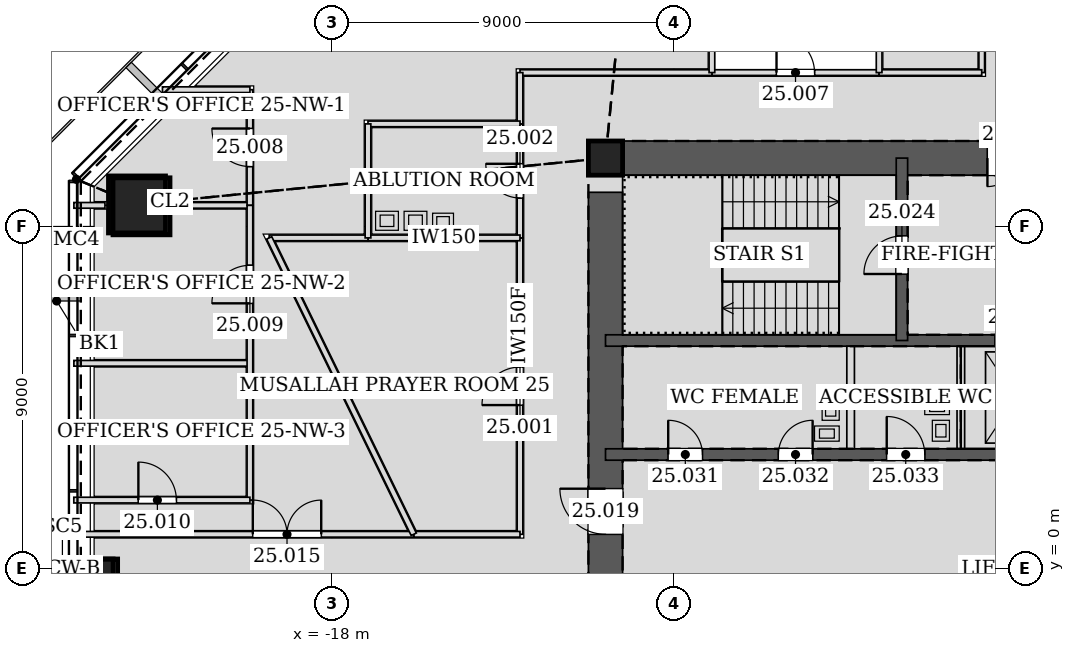
"""IFC4 building model, lengths in metres.
Left out: names, types, materials, properties, quantities, classifications, styles, units other than length and angle.
Written with IfcOpenShell. Run it as: python <this file> out.ifc"""

import sys

from ifc_helpers import new_model, si_unit, direction, frame, frame_2d, origin, origin_2d, place, context, subcontext, project, spatial, rectangle, hollow_rectangle, extrude, element, fill, save


model = new_model("IFC4")
c1 = context("Model", 3, precision=1e-05, world=origin(), true_north=direction((0.0, 1.0)))
c2 = subcontext(c1, "Body", "Model", "MODEL_VIEW")
j1 = project(units=[si_unit("LENGTHUNIT", "METRE"), si_unit("PLANEANGLEUNIT", "RADIAN")], contexts=[c1])
p1 = place(None, origin())
s1 = spatial("IfcSite", under=j1, at=p1, CompositionType="ELEMENT")
p2 = place(p1, origin())
s2 = spatial("IfcBuilding", under=s1, at=p2, CompositionType="ELEMENT")
p3 = place(p2, frame((0.0, 0.0, 113.4)))
s3 = spatial("IfcBuildingStorey", under=s2, at=p3, CompositionType="ELEMENT", Elevation=113.4)
p4 = place(p3, frame((-23.129, 9.58, 0.0), z_axis=(0.028294106277, -0.011677854952, 0.999531425846), x_axis=(0.38151339852, 0.924363308851, 0.0)))
e1 = element("IfcColumn", 1, at=p4, inside=s3, PredefinedType="COLUMN", context=c2, shape_type="SweptSolid", body=[
    extrude(hollow_rectangle(XDim=1.5, YDim=1.5, WallThickness=0.07, at=origin_2d()), origin(), (0.0, 0.0, 1.0), 4.202),
])
p5 = place(p3, frame((-24.007, 0.0, 0.0), z_axis=(0.02829603574, 0.0, 0.999599587015), x_axis=(0.0, 1.0, 0.0)))
e2 = element("IfcColumn", 2, at=p5, inside=s3, PredefinedType="COLUMN", context=c2, shape_type="SweptSolid", body=[
    extrude(hollow_rectangle(XDim=0.5, YDim=0.5, WallThickness=0.025, at=origin_2d()), origin(), (0.0, 0.0, 1.0), 4.202),
])
p6 = place(p3, frame((-10.8, 10.8, 0.0), z_axis=(0.0, 0.0, 1.0), x_axis=(1.0, 0.0, 0.0)))
e3 = element("IfcColumn", 3, at=p6, inside=s3, PredefinedType="COLUMN", context=c2, shape_type="SweptSolid", body=[
    extrude(hollow_rectangle(XDim=0.9, YDim=0.9, WallThickness=0.06, at=origin_2d()), origin(), (0.0, 0.0, 1.0), 4.2),
])
p7 = place(p3, frame((10.8, 10.8, 0.0), z_axis=(0.0, 0.0, 1.0), x_axis=(-1.0, 0.0, 0.0)))
e4 = element("IfcWall", 4, at=p7, inside=s3, PredefinedType="SOLIDWALL", context=c2, shape_type="SweptSolid", body=[
    extrude(rectangle(XDim=21.6, YDim=0.9, at=frame_2d((10.8, 0.0))), origin(), (0.0, 0.0, 1.0), 4.2),
])
p8 = place(p7, frame((10.05, 0.0, 0.0)))
e5 = element("IfcOpeningElement", 5, at=p8, cuts=e4, PredefinedType="OPENING", context=c2, shape_type="SweptSolid", body=[
    extrude(rectangle(XDim=1.5, YDim=2.1, at=frame_2d((0.75, 1.05))), frame((0.0, 0.46, 0.0), z_axis=(0.0, -1.0, 0.0), x_axis=(1.0, 0.0, 0.0)), (0.0, 0.0, 1.0), 0.92),
])
p9 = place(p3, frame((-10.8, 10.8, 0.0), z_axis=(0.0, 0.0, 1.0), x_axis=(0.0, -1.0, 0.0)))
e6 = element("IfcWall", 6, at=p9, inside=s3, PredefinedType="SOLIDWALL", context=c2, shape_type="SweptSolid", body=[
    extrude(rectangle(XDim=21.6, YDim=0.9, at=frame_2d((10.8, 0.0))), origin(), (0.0, 0.0, 1.0), 4.2),
])
p10 = place(p9, frame((8.7, 0.0, 0.0)))
e7 = element("IfcOpeningElement", 7, at=p10, cuts=e6, PredefinedType="OPENING", context=c2, shape_type="SweptSolid", body=[
    extrude(rectangle(XDim=1.2, YDim=2.1, at=frame_2d((0.6, 1.05))), frame((0.0, 0.46, 0.0), z_axis=(0.0, -1.0, 0.0), x_axis=(1.0, 0.0, 0.0)), (0.0, 0.0, 1.0), 0.92),
])
p11 = place(p9, frame((11.7, 0.0, 0.0)))
e8 = element("IfcOpeningElement", 8, at=p11, cuts=e6, PredefinedType="OPENING", context=c2, shape_type="SweptSolid", body=[
    extrude(rectangle(XDim=1.2, YDim=2.1, at=frame_2d((0.6, 1.05))), frame((0.0, 0.46, 0.0), z_axis=(0.0, -1.0, 0.0), x_axis=(1.0, 0.0, 0.0)), (0.0, 0.0, 1.0), 0.92),
])
p12 = place(p3, frame((-10.8, 3.0, 0.0), z_axis=(0.0, 0.0, 1.0), x_axis=(1.0, 0.0, 0.0)))
e9 = element("IfcWall", 9, at=p12, inside=s3, PredefinedType="SOLIDWALL", context=c2, shape_type="SweptSolid", body=[
    extrude(rectangle(XDim=21.6, YDim=0.3, at=frame_2d((10.8, 0.0))), origin(), (0.0, 0.0, 1.0), 4.2),
])
p13 = place(p12, frame((1.65, 0.0, 0.0)))
e10 = element("IfcOpeningElement", 10, at=p13, cuts=e9, PredefinedType="OPENING", context=c2, shape_type="SweptSolid", body=[
    extrude(rectangle(XDim=0.9, YDim=2.1, at=frame_2d((0.45, 1.05))), frame((0.0, 0.16, 0.0), z_axis=(0.0, -1.0, 0.0), x_axis=(1.0, 0.0, 0.0)), (0.0, 0.0, 1.0), 0.32),
])
p14 = place(p12, frame((4.55, 0.0, 0.0)))
e11 = element("IfcOpeningElement", 11, at=p14, cuts=e9, PredefinedType="OPENING", context=c2, shape_type="SweptSolid", body=[
    extrude(rectangle(XDim=0.9, YDim=2.1, at=frame_2d((0.45, 1.05))), frame((0.0, 0.16, 0.0), z_axis=(0.0, -1.0, 0.0), x_axis=(1.0, 0.0, 0.0)), (0.0, 0.0, 1.0), 0.32),
])
p15 = place(p12, frame((7.4, 0.0, 0.0)))
e12 = element("IfcOpeningElement", 12, at=p15, cuts=e9, PredefinedType="OPENING", context=c2, shape_type="SweptSolid", body=[
    extrude(rectangle(XDim=1.0, YDim=2.1, at=frame_2d((0.5, 1.05))), frame((0.0, 0.16, 0.0), z_axis=(0.0, -1.0, 0.0), x_axis=(1.0, 0.0, 0.0)), (0.0, 0.0, 1.0), 0.32),
])
p16 = place(p12, frame((13.25, 0.0, 0.0)))
e13 = element("IfcOpeningElement", 13, at=p16, cuts=e9, PredefinedType="OPENING", context=c2, shape_type="SweptSolid", body=[
    extrude(rectangle(XDim=0.9, YDim=2.1, at=frame_2d((0.45, 1.05))), frame((0.0, 0.16, 0.0), z_axis=(0.0, -1.0, 0.0), x_axis=(1.0, 0.0, 0.0)), (0.0, 0.0, 1.0), 0.32),
])
p17 = place(p3, frame((-10.8, 6.0, 0.0), z_axis=(0.0, 0.0, 1.0), x_axis=(1.0, 0.0, 0.0)))
e14 = element("IfcWall", 14, at=p17, inside=s3, PredefinedType="SOLIDWALL", context=c2, shape_type="SweptSolid", body=[
    extrude(rectangle(XDim=21.6, YDim=0.3, at=frame_2d((10.8, 0.0))), origin(), (0.0, 0.0, 1.0), 4.2),
])
p18 = place(p17, frame((10.25, 0.0, 0.0)))
e15 = element("IfcOpeningElement", 15, at=p18, cuts=e14, PredefinedType="OPENING", context=c2, shape_type="SweptSolid", body=[
    extrude(rectangle(XDim=1.1, YDim=2.1, at=frame_2d((0.55, 1.05))), frame((0.0, 0.16, 0.0), z_axis=(0.0, -1.0, 0.0), x_axis=(1.0, 0.0, 0.0)), (0.0, 0.0, 1.0), 0.32),
])
p19 = place(p3, frame((-3.0, 6.0, 0.0), z_axis=(0.0, 0.0, 1.0), x_axis=(0.0, 1.0, 0.0)))
e16 = element("IfcWall", 16, at=p19, inside=s3, PredefinedType="SOLIDWALL", context=c2, shape_type="SweptSolid", body=[
    extrude(rectangle(XDim=4.8, YDim=0.3, at=frame_2d((2.4, 0.0))), origin(), (0.0, 0.0, 1.0), 4.2),
])
p20 = place(p19, frame((1.75, 0.0, 0.0)))
e17 = element("IfcOpeningElement", 17, at=p20, cuts=e16, PredefinedType="OPENING", context=c2, shape_type="SweptSolid", body=[
    extrude(rectangle(XDim=1.0, YDim=2.1, at=frame_2d((0.5, 1.05))), frame((0.0, 0.16, 0.0), z_axis=(0.0, -1.0, 0.0), x_axis=(1.0, 0.0, 0.0)), (0.0, 0.0, 1.0), 0.32),
])
p21 = place(p3, frame((-13.05, 8.701, 0.0), z_axis=(0.0, 0.0, 1.0), x_axis=(0.0, -1.0, 0.0)))
e18 = element("IfcWall", 18, at=p21, inside=s3, PredefinedType="PARTITIONING", context=c2, shape_type="SweptSolid", body=[
    extrude(rectangle(XDim=7.801, YDim=0.15, at=frame_2d((3.9, 0.0))), origin(), (0.0, 0.0, 1.0), 4.035),
])
p22 = place(p21, frame((3.4, 0.0, 0.0)))
e19 = element("IfcOpeningElement", 19, at=p22, cuts=e18, PredefinedType="OPENING", context=c2, shape_type="SweptSolid", body=[
    extrude(rectangle(XDim=1.0, YDim=2.1, at=frame_2d((0.5, 1.05))), frame((0.0, 0.085, 0.0), z_axis=(0.0, -1.0, 0.0), x_axis=(1.0, 0.0, 0.0)), (0.0, 0.0, 1.0), 0.17),
])
p23 = place(p3, frame((-13.05, 0.9, 0.0), z_axis=(0.0, 0.0, 1.0), x_axis=(-1.0, 0.0, 0.0)))
e20 = element("IfcWall", 20, at=p23, inside=s3, PredefinedType="PARTITIONING", context=c2, shape_type="SweptSolid", body=[
    extrude(rectangle(XDim=2.797, YDim=0.15, at=frame_2d((1.398, 0.0))), origin(), (0.0, 0.0, 1.0), 3.426),
])
p24 = place(p3, frame((-13.05, 11.701, 0.0), z_axis=(0.0, 0.0, 1.0), x_axis=(0.0, -1.0, 0.0)))
e21 = element("IfcWall", 21, at=p24, inside=s3, PredefinedType="PARTITIONING", context=c2, shape_type="SweptSolid", body=[
    extrude(rectangle(XDim=3.002, YDim=0.15, at=frame_2d((1.501, 0.0))), origin(), (0.0, 0.0, 1.0), 3.098),
])
p25 = place(p24, frame((1.051, 0.0, 0.0)))
e22 = element("IfcOpeningElement", 22, at=p25, cuts=e21, PredefinedType="OPENING", context=c2, shape_type="SweptSolid", body=[
    extrude(rectangle(XDim=0.9, YDim=2.1, at=frame_2d((0.45, 1.05))), frame((0.0, 0.085, 0.0), z_axis=(0.0, -1.0, 0.0), x_axis=(1.0, 0.0, 0.0)), (0.0, 0.0, 1.0), 0.17),
])
p26 = place(p3, frame((-3.599, 13.05, 0.0), z_axis=(0.0, 0.0, 1.0), x_axis=(-1.0, 0.0, 0.0)))
e23 = element("IfcWall", 23, at=p26, inside=s3, PredefinedType="PARTITIONING", context=c2, shape_type="SweptSolid", body=[
    extrude(rectangle(XDim=4.402, YDim=0.15, at=frame_2d((2.201, 0.0))), origin(), (0.0, 0.0, 1.0), 4.035),
])
p27 = place(p26, frame((1.701, 0.0, 0.0)))
e24 = element("IfcOpeningElement", 24, at=p27, cuts=e23, PredefinedType="OPENING", context=c2, shape_type="SweptSolid", body=[
    extrude(rectangle(XDim=1.0, YDim=2.1, at=frame_2d((0.5, 1.05))), frame((0.0, 0.085, 0.0), z_axis=(0.0, -1.0, 0.0), x_axis=(1.0, 0.0, 0.0)), (0.0, 0.0, 1.0), 0.17),
])
p28 = place(p3, frame((-15.844, 0.9, 0.0), z_axis=(0.0, 0.0, 1.0), x_axis=(-1.0, 0.0, 0.0)))
e25 = element("IfcWall", 25, at=p28, inside=s3, PredefinedType="PARTITIONING", context=c2, shape_type="SweptSolid", body=[
    extrude(rectangle(XDim=8.946, YDim=0.15, at=frame_2d((4.473, 0.0))), origin(), (0.0, 0.0, 1.0), 3.492),
])
p29 = place(p28, frame((2.436, 0.0, 0.0)))
e26 = element("IfcOpeningElement", 26, at=p29, cuts=e25, PredefinedType="OPENING", context=c2, shape_type="SweptSolid", body=[
    extrude(rectangle(XDim=1.8, YDim=2.4, at=frame_2d((0.9, 1.2))), frame((0.0, 0.085, 0.0), z_axis=(0.0, -1.0, 0.0), x_axis=(1.0, 0.0, 0.0)), (0.0, 0.0, 1.0), 0.17),
])
p30 = place(p3, frame((-7.999, 13.05, 0.0), z_axis=(0.0, 0.0, 1.0), x_axis=(-1.0, 0.0, 0.0)))
e27 = element("IfcWall", 27, at=p30, inside=s3, PredefinedType="PARTITIONING", context=c2, shape_type="SweptSolid", body=[
    extrude(rectangle(XDim=5.051, YDim=0.15, at=frame_2d((2.525, 0.0))), origin(), (0.0, 0.0, 1.0), 3.098),
])
p31 = place(p3, frame((-13.05, 13.05, 0.0), z_axis=(0.0, 0.0, 1.0), x_axis=(0.0, -1.0, 0.0)))
e28 = element("IfcWall", 28, at=p31, inside=s3, PredefinedType="PARTITIONING", context=c2, shape_type="SweptSolid", body=[
    extrude(rectangle(XDim=1.351, YDim=0.15, at=frame_2d((0.676, 0.0))), origin(), (0.0, 0.0, 1.0), 3.184),
])
p32 = place(p3, frame((-0.9, 19.858, 0.0), z_axis=(0.0, 0.0, 1.0), x_axis=(0.0, -1.0, 0.0)))
e29 = element("IfcWall", 29, at=p32, inside=s3, PredefinedType="PARTITIONING", context=c2, shape_type="SweptSolid", body=[
    extrude(rectangle(XDim=6.808, YDim=0.15, at=frame_2d((3.404, 0.0))), origin(), (0.0, 0.0, 1.0), 3.426),
])
p33 = place(p3, frame((-0.9, 13.05, 0.0), z_axis=(0.0, 0.0, 1.0), x_axis=(-1.0, 0.0, 0.0)))
e30 = element("IfcWall", 30, at=p33, inside=s3, PredefinedType="PARTITIONING", context=c2, shape_type="SweptSolid", body=[
    extrude(rectangle(XDim=2.701, YDim=0.15, at=frame_2d((1.351, 0.0))), origin(), (0.0, 0.0, 1.0), 4.035),
])
p34 = place(p3, frame((-13.05, 8.7, 0.0), z_axis=(0.0, 0.0, 1.0), x_axis=(-1.0, 0.0, 0.0)))
e31 = element("IfcWall", 31, at=p34, inside=s3, PredefinedType="PARTITIONING", context=c2, shape_type="SweptSolid", body=[
    extrude(rectangle(XDim=4.001, YDim=0.15, at=frame_2d((2.0, 0.0))), origin(), (0.0, 0.0, 1.0), 3.426),
])
p35 = place(p3, frame((-17.049, 8.7, 0.0), z_axis=(0.0, 0.0, 1.0), x_axis=(-1.0, 0.0, 0.0)))
e32 = element("IfcWall", 32, at=p35, inside=s3, PredefinedType="PARTITIONING", context=c2, shape_type="SweptSolid", body=[
    extrude(rectangle(XDim=2.601, YDim=0.15, at=frame_2d((1.3, 0.0))), origin(), (0.0, 0.0, 1.0), 3.499),
])
p36 = place(p3, frame((-19.65, 8.7, 0.0), z_axis=(0.0, 0.0, 1.0), x_axis=(0.438358227548, -0.898800347319, 0.0)))
e33 = element("IfcWall", 33, at=p36, inside=s3, PredefinedType="PARTITIONING", context=c2, shape_type="SweptSolid", body=[
    extrude(rectangle(XDim=8.678, YDim=0.15, at=frame_2d((4.339, 0.0))), origin(), (0.0, 0.0, 1.0), 3.499),
])
p37 = place(p3, frame((-13.05, 11.7, 0.0), z_axis=(0.0, 0.0, 1.0), x_axis=(-1.0, 0.0, 0.0)))
e34 = element("IfcWall", 34, at=p37, inside=s3, PredefinedType="PARTITIONING", context=c2, shape_type="SweptSolid", body=[
    extrude(rectangle(XDim=4.0, YDim=0.15, at=frame_2d((2.0, 0.0))), origin(), (0.0, 0.0, 1.0), 3.715),
])
p38 = place(p3, frame((-17.05, 11.7, 0.0), z_axis=(0.0, 0.0, 1.0), x_axis=(0.0, -1.0, 0.0)))
e35 = element("IfcWall", 35, at=p38, inside=s3, PredefinedType="PARTITIONING", context=c2, shape_type="SweptSolid", body=[
    extrude(rectangle(XDim=3.0, YDim=0.15, at=frame_2d((1.5, 0.0))), origin(), (0.0, 0.0, 1.0), 3.098),
])
for number, where, z_axis, x_axis in (
    (36, (-3.6, 13.05, 0.0), (0.0, 0.0, 1.0), (0.0, 1.0, 0.0)),
    (37, (-8.0, 15.75, 0.0), (0.0, 0.0, 1.0), (0.0, -1.0, 0.0)),
):
    element("IfcWall", number, at=place(p3, frame(where, z_axis=z_axis, x_axis=x_axis)), inside=s3, PredefinedType="PARTITIONING", context=c2, shape_type="SweptSolid", body=[
        extrude(rectangle(XDim=2.7, YDim=0.15, at=frame_2d((1.35, 0.0))), origin(), (0.0, 0.0, 1.0), 3.426),
    ])
p39 = place(p3, frame((-24.789, 9.556, 0.0), z_axis=(0.0, 0.0, 1.0), x_axis=(1.0, 0.0, 0.0)))
e38 = element("IfcWall", 38, at=p39, inside=s3, PredefinedType="PARTITIONING", context=c2, shape_type="SweptSolid", body=[
    extrude(rectangle(XDim=0.818, YDim=0.15, at=frame_2d((0.409, 0.0))), origin(), (0.0, 0.0, 1.0), 4.035),
])
p40 = place(p3, frame((-22.167, 9.556, 0.0), z_axis=(0.0, 0.0, 1.0), x_axis=(1.0, 0.0, 0.0)))
e39 = element("IfcWall", 39, at=p40, inside=s3, PredefinedType="PARTITIONING", context=c2, shape_type="SweptSolid", body=[
    extrude(rectangle(XDim=2.01, YDim=0.15, at=frame_2d((1.005, 0.0))), origin(), (0.0, 0.0, 1.0), 3.098),
])
p41 = place(p3, frame((-20.157, 9.556, 0.0), z_axis=(0.0, 0.0, 1.0), x_axis=(0.0, 1.0, 0.0)))
e40 = element("IfcWall", 40, at=p41, inside=s3, PredefinedType="PARTITIONING", context=c2, shape_type="SweptSolid", body=[
    extrude(rectangle(XDim=3.044, YDim=0.15, at=frame_2d((1.522, 0.0))), origin(), (0.0, 0.0, 1.0), 3.098),
])
p42 = place(p41, frame((1.022, 0.0, 0.0)))
e41 = element("IfcOpeningElement", 41, at=p42, cuts=e40, PredefinedType="OPENING", context=c2, shape_type="SweptSolid", body=[
    extrude(rectangle(XDim=1.0, YDim=2.1, at=frame_2d((0.5, 1.05))), frame((0.0, 0.085, 0.0), z_axis=(0.0, -1.0, 0.0), x_axis=(1.0, 0.0, 0.0)), (0.0, 0.0, 1.0), 0.17),
])
p43 = place(p3, frame((-20.157, 12.6, 0.0), z_axis=(0.0, 0.0, 1.0), x_axis=(-1.0, 0.0, 0.0)))
e42 = element("IfcWall", 42, at=p43, inside=s3, PredefinedType="PARTITIONING", context=c2, shape_type="SweptSolid", body=[
    extrude(rectangle(XDim=2.302, YDim=0.15, at=frame_2d((1.151, 0.0))), origin(), (0.0, 0.0, 1.0), 3.499),
])
p44 = place(p3, frame((-24.789, 5.4, 0.0), z_axis=(0.0, 0.0, 1.0), x_axis=(1.0, 0.0, 0.0)))
e43 = element("IfcWall", 43, at=p44, inside=s3, PredefinedType="PARTITIONING", context=c2, shape_type="SweptSolid", body=[
    extrude(rectangle(XDim=4.632, YDim=0.15, at=frame_2d((2.316, 0.0))), origin(), (0.0, 0.0, 1.0), 3.492),
])
p45 = place(p3, frame((-20.157, 9.556, 0.0), z_axis=(0.0, 0.0, 1.0), x_axis=(0.0, -1.0, 0.0)))
e44 = element("IfcWall", 44, at=p45, inside=s3, PredefinedType="PARTITIONING", context=c2, shape_type="SweptSolid", body=[
    extrude(rectangle(XDim=7.756, YDim=0.15, at=frame_2d((3.878, 0.0))), origin(), (0.0, 0.0, 1.0), 4.035),
])
p46 = place(p45, frame((1.578, 0.0, 0.0)))
e45 = element("IfcOpeningElement", 45, at=p46, cuts=e44, PredefinedType="OPENING", context=c2, shape_type="SweptSolid", body=[
    extrude(rectangle(XDim=1.0, YDim=2.1, at=frame_2d((0.5, 1.05))), frame((0.0, 0.085, 0.0), z_axis=(0.0, -1.0, 0.0), x_axis=(1.0, 0.0, 0.0)), (0.0, 0.0, 1.0), 0.17),
])
p47 = place(p3, frame((-24.791, 1.8, 0.0), z_axis=(0.0, 0.0, 1.0), x_axis=(1.0, 0.0, 0.0)))
e46 = element("IfcWall", 46, at=p47, inside=s3, PredefinedType="PARTITIONING", context=c2, shape_type="SweptSolid", body=[
    extrude(rectangle(XDim=4.634, YDim=0.15, at=frame_2d((2.317, 0.0))), origin(), (0.0, 0.0, 1.0), 3.492),
])
p48 = place(p47, frame((1.699, 0.0, 0.0)))
e47 = element("IfcOpeningElement", 47, at=p48, cuts=e46, PredefinedType="OPENING", context=c2, shape_type="SweptSolid", body=[
    extrude(rectangle(XDim=1.0, YDim=2.1, at=frame_2d((0.5, 1.05))), frame((0.0, 0.085, 0.0), z_axis=(0.0, -1.0, 0.0), x_axis=(1.0, 0.0, 0.0)), (0.0, 0.0, 1.0), 0.17),
])
for number, where, z_axis, x_axis in (
    (48, (-4.35, 3.15, 0.0), (0.0, 0.0, 1.0), (0.0, 1.0, 0.0)),
    (49, (-1.45, 3.15, 0.0), (0.0, 0.0, 1.0), (0.0, 1.0, 0.0)),
):
    element("IfcWall", number, at=place(p3, frame(where, z_axis=z_axis, x_axis=x_axis)), inside=s3, PredefinedType="PARTITIONING", context=c2, shape_type="SweptSolid", body=[
        extrude(rectangle(XDim=2.7, YDim=0.2, at=frame_2d((1.35, 0.0))), origin(), (0.0, 0.0, 1.0), 4.035),
    ])
p49 = place(p22, frame((1.0, 0.0, 0.0), z_axis=(0.0, 0.0, 1.0), x_axis=(-1.0, 0.0, 0.0)))
e50 = element("IfcDoor", 50, at=p49, inside=s3, OperationType="SINGLE_SWING_LEFT", PredefinedType="DOOR", context=c2, shape_type="SweptSolid", body=[
    extrude(rectangle(XDim=1.0, YDim=2.1, at=frame_2d((0.5, 1.05))), frame((0.0, 0.025, 0.0), z_axis=(0.0, -1.0, 0.0), x_axis=(1.0, 0.0, 0.0)), (0.0, 0.0, 1.0), 0.05),
])
fill(e19, e50)
p50 = place(p25, frame((0.9, 0.0, 0.0), z_axis=(0.0, 0.0, 1.0), x_axis=(-1.0, 0.0, 0.0)))
e51 = element("IfcDoor", 51, at=p50, inside=s3, OperationType="SINGLE_SWING_RIGHT", PredefinedType="DOOR", context=c2, shape_type="SweptSolid", body=[
    extrude(rectangle(XDim=0.9, YDim=2.1, at=frame_2d((0.45, 1.05))), frame((0.0, 0.025, 0.0), z_axis=(0.0, -1.0, 0.0), x_axis=(1.0, 0.0, 0.0)), (0.0, 0.0, 1.0), 0.05),
])
fill(e22, e51)
p51 = place(p27, frame((1.0, 0.0, 0.0), z_axis=(0.0, 0.0, 1.0), x_axis=(-1.0, 0.0, 0.0)))
e52 = element("IfcDoor", 52, at=p51, inside=s3, OperationType="SINGLE_SWING_LEFT", PredefinedType="DOOR", context=c2, shape_type="SweptSolid", body=[
    extrude(rectangle(XDim=1.0, YDim=2.1, at=frame_2d((0.5, 1.05))), frame((0.0, 0.025, 0.0), z_axis=(0.0, -1.0, 0.0), x_axis=(1.0, 0.0, 0.0)), (0.0, 0.0, 1.0), 0.05),
])
fill(e24, e52)
p52 = place(p42, origin())
e53 = element("IfcDoor", 53, at=p52, inside=s3, OperationType="SINGLE_SWING_RIGHT", PredefinedType="DOOR", context=c2, shape_type="SweptSolid", body=[
    extrude(rectangle(XDim=1.0, YDim=2.1, at=frame_2d((0.5, 1.05))), frame((0.0, 0.025, 0.0), z_axis=(0.0, -1.0, 0.0), x_axis=(1.0, 0.0, 0.0)), (0.0, 0.0, 1.0), 0.05),
])
fill(e41, e53)
p53 = place(p46, frame((1.0, 0.0, 0.0), z_axis=(0.0, 0.0, 1.0), x_axis=(-1.0, 0.0, 0.0)))
e54 = element("IfcDoor", 54, at=p53, inside=s3, OperationType="SINGLE_SWING_LEFT", PredefinedType="DOOR", context=c2, shape_type="SweptSolid", body=[
    extrude(rectangle(XDim=1.0, YDim=2.1, at=frame_2d((0.5, 1.05))), frame((0.0, 0.025, 0.0), z_axis=(0.0, -1.0, 0.0), x_axis=(1.0, 0.0, 0.0)), (0.0, 0.0, 1.0), 0.05),
])
fill(e45, e54)
p54 = place(p48, origin())
e55 = element("IfcDoor", 55, at=p54, inside=s3, OperationType="SINGLE_SWING_LEFT", PredefinedType="DOOR", context=c2, shape_type="SweptSolid", body=[
    extrude(rectangle(XDim=1.0, YDim=2.1, at=frame_2d((0.5, 1.05))), frame((0.0, 0.025, 0.0), z_axis=(0.0, -1.0, 0.0), x_axis=(1.0, 0.0, 0.0)), (0.0, 0.0, 1.0), 0.05),
])
fill(e47, e55)
p55 = place(p29, frame((1.8, 0.0, 0.0), z_axis=(0.0, 0.0, 1.0), x_axis=(-1.0, 0.0, 0.0)))
e56 = element("IfcDoor", 56, at=p55, inside=s3, OperationType="DOUBLE_DOOR_SINGLE_SWING", PredefinedType="DOOR", context=c2, shape_type="SweptSolid", body=[
    extrude(rectangle(XDim=1.8, YDim=2.4, at=frame_2d((0.9, 1.2))), frame((0.0, 0.025, 0.0), z_axis=(0.0, -1.0, 0.0), x_axis=(1.0, 0.0, 0.0)), (0.0, 0.0, 1.0), 0.05),
])
fill(e26, e56)
p56 = place(p10, frame((1.2, 0.0, 0.0), z_axis=(0.0, 0.0, 1.0), x_axis=(-1.0, 0.0, 0.0)))
e57 = element("IfcDoor", 57, at=p56, inside=s3, OperationType="SINGLE_SWING_RIGHT", PredefinedType="DOOR", context=c2, shape_type="SweptSolid", body=[
    extrude(rectangle(XDim=1.2, YDim=2.1, at=frame_2d((0.6, 1.05))), frame((0.0, 0.025, 0.0), z_axis=(0.0, -1.0, 0.0), x_axis=(1.0, 0.0, 0.0)), (0.0, 0.0, 1.0), 0.05),
])
fill(e7, e57)
p57 = place(p8, origin())
e58 = element("IfcDoor", 58, at=p57, inside=s3, OperationType="DOUBLE_DOOR_SINGLE_SWING", PredefinedType="DOOR", context=c2, shape_type="SweptSolid", body=[
    extrude(rectangle(XDim=1.5, YDim=2.1, at=frame_2d((0.75, 1.05))), frame((0.0, 0.025, 0.0), z_axis=(0.0, -1.0, 0.0), x_axis=(1.0, 0.0, 0.0)), (0.0, 0.0, 1.0), 0.05),
])
fill(e5, e58)
p58 = place(p20, origin())
e59 = element("IfcDoor", 59, at=p58, inside=s3, OperationType="SINGLE_SWING_LEFT", PredefinedType="DOOR", context=c2, shape_type="SweptSolid", body=[
    extrude(rectangle(XDim=1.0, YDim=2.1, at=frame_2d((0.5, 1.05))), frame((0.0, 0.025, 0.0), z_axis=(0.0, -1.0, 0.0), x_axis=(1.0, 0.0, 0.0)), (0.0, 0.0, 1.0), 0.05),
])
fill(e17, e59)
p59 = place(p13, origin())
e60 = element("IfcDoor", 60, at=p59, inside=s3, OperationType="SINGLE_SWING_LEFT", PredefinedType="DOOR", context=c2, shape_type="SweptSolid", body=[
    extrude(rectangle(XDim=0.9, YDim=2.1, at=frame_2d((0.45, 1.05))), frame((0.0, 0.025, 0.0), z_axis=(0.0, -1.0, 0.0), x_axis=(1.0, 0.0, 0.0)), (0.0, 0.0, 1.0), 0.05),
])
fill(e10, e60)
p60 = place(p14, origin())
e61 = element("IfcDoor", 61, at=p60, inside=s3, OperationType="SINGLE_SWING_RIGHT", PredefinedType="DOOR", context=c2, shape_type="SweptSolid", body=[
    extrude(rectangle(XDim=0.9, YDim=2.1, at=frame_2d((0.45, 1.05))), frame((0.0, 0.025, 0.0), z_axis=(0.0, -1.0, 0.0), x_axis=(1.0, 0.0, 0.0)), (0.0, 0.0, 1.0), 0.05),
])
fill(e11, e61)
p61 = place(p15, origin())
e62 = element("IfcDoor", 62, at=p61, inside=s3, OperationType="SINGLE_SWING_LEFT", PredefinedType="DOOR", context=c2, shape_type="SweptSolid", body=[
    extrude(rectangle(XDim=1.0, YDim=2.1, at=frame_2d((0.5, 1.05))), frame((0.0, 0.025, 0.0), z_axis=(0.0, -1.0, 0.0), x_axis=(1.0, 0.0, 0.0)), (0.0, 0.0, 1.0), 0.05),
])
fill(e12, e62)
save(model, sys.argv[1])
